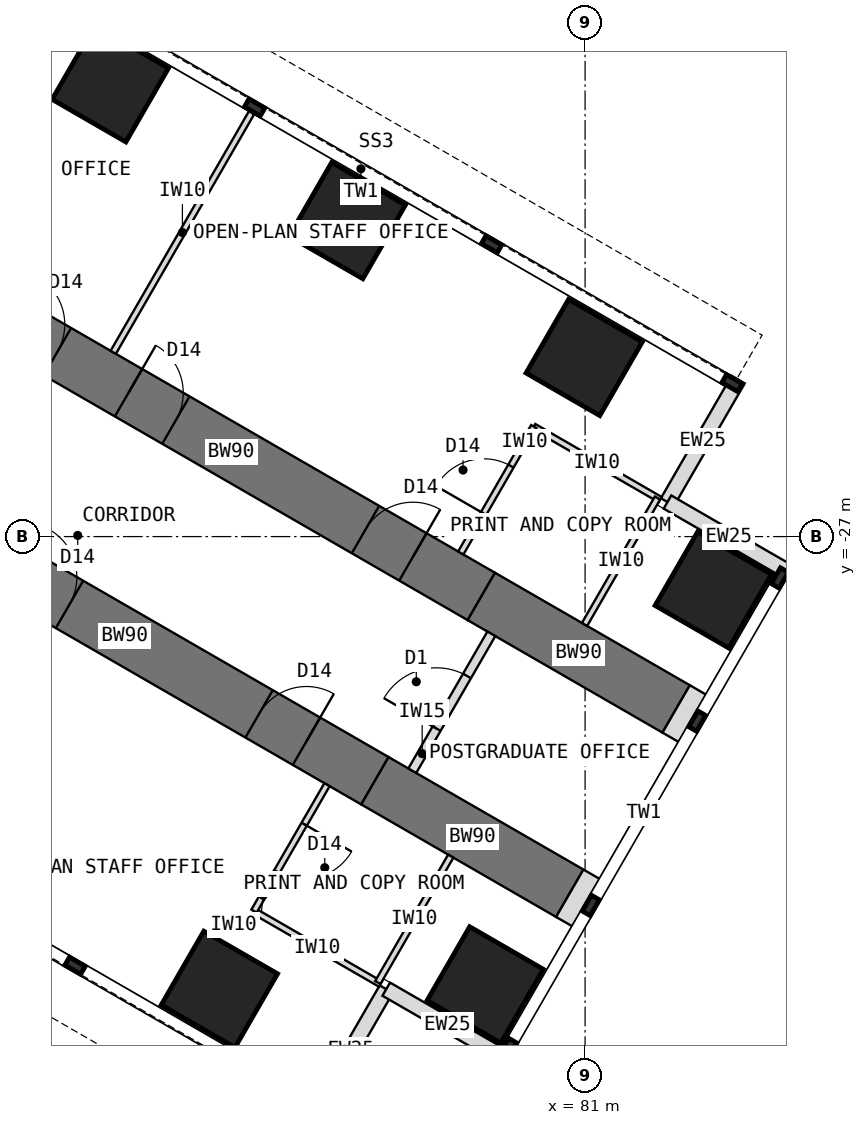
"""IFC4 building model, lengths in metres.
Left out: names, types, materials, properties, quantities, classifications, styles, units other than length and angle.
Written with IfcOpenShell. Run it as: python <this file> out.ifc"""

import sys

from ifc_helpers import new_model, si_unit, direction, frame, frame_2d, origin, origin_2d, place, context, subcontext, project, spatial, rectangle, extrude, element, fill, save


model = new_model("IFC4")
c1 = context("Model", 3, precision=1e-05, world=origin(), true_north=direction((0.0, 1.0)))
c2 = subcontext(c1, "Body", "Model", "MODEL_VIEW")
j1 = project(units=[si_unit("LENGTHUNIT", "METRE"), si_unit("PLANEANGLEUNIT", "RADIAN")], contexts=[c1])
p1 = place(None, origin())
s1 = spatial("IfcSite", under=j1, at=p1, CompositionType="ELEMENT")
p2 = place(p1, origin())
s2 = spatial("IfcBuilding", under=s1, at=p2, CompositionType="ELEMENT")
p3 = place(p2, frame((0.0, 0.0, 76.5)))
s3 = spatial("IfcBuildingStorey", under=s2, at=p3, CompositionType="ELEMENT", Elevation=76.5)
p4 = place(p3, frame((71.066, -23.234, 0.0), z_axis=(0.0, 0.0, 1.0), x_axis=(0.86602681393, -0.499997557548, 0.0)))
e1 = element("IfcWall", 1, at=p4, inside=s3, PredefinedType="SHEAR", context=c2, shape_type="SweptSolid", body=[
    extrude(rectangle(XDim=9.5, YDim=0.9, at=frame_2d((4.75, 0.0))), origin(), (0.0, 0.0, 1.0), 4.0),
])
p5 = place(p4, frame((0.55, 0.0, 0.0)))
e2 = element("IfcOpeningElement", 2, at=p5, cuts=e1, PredefinedType="OPENING", context=c2, shape_type="SweptSolid", body=[
    extrude(rectangle(XDim=0.9, YDim=2.1, at=frame_2d((0.45, 1.05))), frame((0.0, 0.46, 0.0), z_axis=(0.0, -1.0, 0.0), x_axis=(1.0, 0.0, 0.0)), (0.0, 0.0, 1.0), 0.92),
])
p6 = place(p4, frame((2.8, 0.0, 0.0)))
e3 = element("IfcOpeningElement", 3, at=p6, cuts=e1, PredefinedType="OPENING", context=c2, shape_type="SweptSolid", body=[
    extrude(rectangle(XDim=0.9, YDim=2.1, at=frame_2d((0.45, 1.05))), frame((0.0, 0.46, 0.0), z_axis=(0.0, -1.0, 0.0), x_axis=(1.0, 0.0, 0.0)), (0.0, 0.0, 1.0), 0.92),
])
p7 = place(p4, frame((7.3, 0.0, 0.0)))
e4 = element("IfcOpeningElement", 4, at=p7, cuts=e1, PredefinedType="OPENING", context=c2, shape_type="SweptSolid", body=[
    extrude(rectangle(XDim=0.9, YDim=2.1, at=frame_2d((0.45, 1.05))), frame((0.0, 0.46, 0.0), z_axis=(0.0, -1.0, 0.0), x_axis=(1.0, 0.0, 0.0)), (0.0, 0.0, 1.0), 0.92),
])
p8 = place(p3, frame((79.294, -27.984, 0.0), z_axis=(0.0, 0.0, 1.0), x_axis=(0.866000971088, -0.500042316284, 0.0)))
e5 = element("IfcWall", 5, at=p8, inside=s3, PredefinedType="SHEAR", context=c2, shape_type="SweptSolid", body=[
    extrude(rectangle(XDim=3.7, YDim=0.9, at=frame_2d((1.85, 0.0))), origin(), (0.0, 0.0, 1.0), 4.0),
])
p9 = place(p3, frame((69.316, -26.266, 0.0), z_axis=(0.0, 0.0, 1.0), x_axis=(0.86602681393, -0.499997557548, 0.0)))
e6 = element("IfcWall", 6, at=p9, inside=s3, PredefinedType="SHEAR", context=c2, shape_type="SweptSolid", body=[
    extrude(rectangle(XDim=9.5, YDim=0.9, at=frame_2d((4.75, 0.0))), origin(), (0.0, 0.0, 1.0), 4.0),
])
p10 = place(p9, frame((0.55, 0.0, 0.0)))
e7 = element("IfcOpeningElement", 7, at=p10, cuts=e6, PredefinedType="OPENING", context=c2, shape_type="SweptSolid", body=[
    extrude(rectangle(XDim=0.9, YDim=2.1, at=frame_2d((0.45, 1.05))), frame((0.0, 0.46, 0.0), z_axis=(0.0, -1.0, 0.0), x_axis=(1.0, 0.0, 0.0)), (0.0, 0.0, 1.0), 0.92),
])
p11 = place(p9, frame((2.8, 0.0, 0.0)))
e8 = element("IfcOpeningElement", 8, at=p11, cuts=e6, PredefinedType="OPENING", context=c2, shape_type="SweptSolid", body=[
    extrude(rectangle(XDim=0.9, YDim=2.1, at=frame_2d((0.45, 1.05))), frame((0.0, 0.46, 0.0), z_axis=(0.0, -1.0, 0.0), x_axis=(1.0, 0.0, 0.0)), (0.0, 0.0, 1.0), 0.92),
])
p12 = place(p9, frame((7.3, 0.0, 0.0)))
e9 = element("IfcOpeningElement", 9, at=p12, cuts=e6, PredefinedType="OPENING", context=c2, shape_type="SweptSolid", body=[
    extrude(rectangle(XDim=0.9, YDim=2.1, at=frame_2d((0.45, 1.05))), frame((0.0, 0.46, 0.0), z_axis=(0.0, -1.0, 0.0), x_axis=(1.0, 0.0, 0.0)), (0.0, 0.0, 1.0), 0.92),
])
p13 = place(p3, frame((77.544, -31.016, 0.0), z_axis=(0.0, 0.0, 1.0), x_axis=(0.866029545028, -0.499992827086, 0.0)))
e10 = element("IfcWall", 10, at=p13, inside=s3, PredefinedType="SHEAR", context=c2, shape_type="SweptSolid", body=[
    extrude(rectangle(XDim=3.7, YDim=0.9, at=frame_2d((1.85, 0.0))), origin(), (0.0, 0.0, 1.0), 4.0),
])
for number, where, z_axis, x_axis in (
    (11, (73.191, -19.554, 0.0), (0.0, 0.0, 1.0), (0.5, 0.866, 0.0)),
    (12, (77.088, -21.804, 0.0), (0.0, 0.0, 1.0), (0.5, 0.866, 0.0)),
    (13, (80.986, -24.054, 0.0), (0.0, 0.0, 1.0), (0.5, 0.866, 0.0)),
    (14, (74.986, -34.446, 0.0), (0.0, 0.0, 1.0), (0.5, 0.866, 0.0)),
    (15, (83.108, -27.877, 0.0), (0.0, 0.0, 1.0), (0.5, 0.866, 0.0)),
    (16, (79.358, -34.373, 0.0), (0.0, 0.0, 1.0), (0.5, 0.866, 0.0)),
):
    element("IfcColumn", number, at=place(p3, frame(where, z_axis=z_axis, x_axis=x_axis)), inside=s3, PredefinedType="COLUMN", context=c2, shape_type="SweptSolid", body=[
        extrude(rectangle(XDim=1.4, YDim=1.4, at=origin_2d()), origin(), (0.0, 0.0, 1.0), 4.0),
    ])
for number, where, z_axis, x_axis in (
    (17, (83.517, -24.419, 0.0), (0.0, 0.0, 1.0), (-0.5, -0.866, 0.0)),
    (18, (82.355, -26.432, 0.0), (0.0, 0.0, 1.0), (0.866, -0.5, 0.0)),
    (19, (76.567, -36.456, 0.0), (0.0, 0.0, 1.0), (0.5, 0.866, 0.0)),
    (20, (77.73, -34.443, 0.0), (0.0, 0.0, 1.0), (0.866, -0.5, 0.0)),
):
    element("IfcWall", number, at=place(p3, frame(where, z_axis=z_axis, x_axis=x_axis)), inside=s3, PredefinedType="STANDARD", context=c2, shape_type="SweptSolid", body=[
        extrude(rectangle(XDim=2.325, YDim=0.25, at=frame_2d((1.163, 0.0))), origin(), (0.0, 0.0, 1.0), 3.8),
    ])
for number, where, z_axis, x_axis in (
    (21, (82.498, -29.834, 0.0), (0.0, 0.0, 1.0), (0.866, -0.5, 0.0)),
    (22, (80.748, -32.865, 0.0), (0.0, 0.0, 1.0), (0.866, -0.5, 0.0)),
):
    element("IfcWall", number, at=place(p3, frame(where, z_axis=z_axis, x_axis=x_axis)), inside=s3, PredefinedType="PARTITIONING", context=c2, shape_type="SweptSolid", body=[
        extrude(rectangle(XDim=0.31, YDim=0.9, at=frame_2d((0.155, 0.0))), origin(), (0.0, 0.0, 1.0), 3.8),
    ])
p14 = place(p3, frame((73.24, -23.97, 0.0), z_axis=(0.0, 0.0, 1.0), x_axis=(0.499982560684, 0.866035472144, 0.0)))
e23 = element("IfcWall", 23, at=p14, inside=s3, PredefinedType="PARTITIONING", context=c2, shape_type="SweptSolid", body=[
    extrude(rectangle(XDim=4.55, YDim=0.1, at=frame_2d((2.275, 0.0))), origin(), (0.0, 0.0, 1.0), 3.8),
])
p15 = place(p3, frame((80.156, -25.191, 0.0), z_axis=(0.0, 0.0, 1.0), x_axis=(0.865980596518, -0.500077600433, 0.0)))
e24 = element("IfcWall", 24, at=p15, inside=s3, PredefinedType="PARTITIONING", context=c2, shape_type="SweptSolid", body=[
    extrude(rectangle(XDim=2.4, YDim=0.1, at=frame_2d((1.2, 0.0))), origin(), (0.0, 0.0, 1.0), 3.8),
])
p16 = place(p3, frame((78.956, -27.27, 0.0), z_axis=(0.0, 0.0, 1.0), x_axis=(0.500033551112, 0.866006032174, 0.0)))
e25 = element("IfcWall", 25, at=p16, inside=s3, PredefinedType="PARTITIONING", context=c2, shape_type="SweptSolid", body=[
    extrude(rectangle(XDim=2.4, YDim=0.1, at=frame_2d((1.2, 0.0))), origin(), (0.0, 0.0, 1.0), 3.8),
])
p17 = place(p16, frame((0.75, 0.0, 0.0)))
e26 = element("IfcOpeningElement", 26, at=p17, cuts=e25, PredefinedType="OPENING", context=c2, shape_type="SweptSolid", body=[
    extrude(rectangle(XDim=0.9, YDim=2.1, at=frame_2d((0.45, 1.05))), frame((0.0, 0.06, 0.0), z_axis=(0.0, -1.0, 0.0), x_axis=(1.0, 0.0, 0.0)), (0.0, 0.0, 1.0), 0.12),
])
p18 = place(p3, frame((80.991, -28.445, 0.0), z_axis=(0.0, 0.0, 1.0), x_axis=(0.500033551112, 0.866006032174, 0.0)))
e27 = element("IfcWall", 27, at=p18, inside=s3, PredefinedType="PARTITIONING", context=c2, shape_type="SweptSolid", body=[
    extrude(rectangle(XDim=2.4, YDim=0.1, at=frame_2d((1.2, 0.0))), origin(), (0.0, 0.0, 1.0), 3.8),
])
p19 = place(p3, frame((75.556, -33.159, 0.0), z_axis=(0.0, 0.0, 1.0), x_axis=(0.866024647952, -0.500001309137, 0.0)))
e28 = element("IfcWall", 28, at=p19, inside=s3, PredefinedType="PARTITIONING", context=c2, shape_type="SweptSolid", body=[
    extrude(rectangle(XDim=2.4, YDim=0.1, at=frame_2d((1.2, 0.0))), origin(), (0.0, 0.0, 1.0), 3.8),
])
p20 = place(p3, frame((76.756, -31.08, 0.0), z_axis=(0.0, 0.0, 1.0), x_axis=(-0.500001309137, -0.866024647952, 0.0)))
e29 = element("IfcWall", 29, at=p20, inside=s3, PredefinedType="PARTITIONING", context=c2, shape_type="SweptSolid", body=[
    extrude(rectangle(XDim=2.4, YDim=0.1, at=frame_2d((1.2, 0.0))), origin(), (0.0, 0.0, 1.0), 3.8),
])
p21 = place(p20, frame((0.75, 0.0, 0.0)))
e30 = element("IfcOpeningElement", 30, at=p21, cuts=e29, PredefinedType="OPENING", context=c2, shape_type="SweptSolid", body=[
    extrude(rectangle(XDim=0.9, YDim=2.1, at=frame_2d((0.45, 1.05))), frame((0.0, 0.06, 0.0), z_axis=(0.0, -1.0, 0.0), x_axis=(1.0, 0.0, 0.0)), (0.0, 0.0, 1.0), 0.12),
])
p22 = place(p3, frame((78.791, -32.255, 0.0), z_axis=(0.0, 0.0, 1.0), x_axis=(-0.500001309137, -0.866024647952, 0.0)))
e31 = element("IfcWall", 31, at=p22, inside=s3, PredefinedType="PARTITIONING", context=c2, shape_type="SweptSolid", body=[
    extrude(rectangle(XDim=2.4, YDim=0.1, at=frame_2d((1.2, 0.0))), origin(), (0.0, 0.0, 1.0), 3.8),
])
p23 = place(p3, frame((78.158, -30.851, 0.0), z_axis=(0.0, 0.0, 1.0), x_axis=(0.500006934395, 0.866021400173, 0.0)))
e32 = element("IfcWall", 32, at=p23, inside=s3, PredefinedType="PARTITIONING", context=c2, shape_type="SweptSolid", body=[
    extrude(rectangle(XDim=2.6, YDim=0.15, at=frame_2d((1.3, 0.0))), origin(), (0.0, 0.0, 1.0), 3.8),
])
p24 = place(p23, frame((0.8, 0.0, 0.0)))
e33 = element("IfcOpeningElement", 33, at=p24, cuts=e32, PredefinedType="OPENING", context=c2, shape_type="SweptSolid", body=[
    extrude(rectangle(XDim=1.0, YDim=2.1, at=frame_2d((0.5, 1.05))), frame((0.0, 0.085, 0.0), z_axis=(0.0, -1.0, 0.0), x_axis=(1.0, 0.0, 0.0)), (0.0, 0.0, 1.0), 0.17),
])
p25 = place(p17, origin())
e34 = element("IfcDoor", 34, at=p25, inside=s3, OperationType="SINGLE_SWING_LEFT", PredefinedType="DOOR", context=c2, shape_type="SweptSolid", body=[
    extrude(rectangle(XDim=0.9, YDim=2.1, at=frame_2d((0.45, 1.05))), frame((0.0, 0.025, 0.0), z_axis=(0.0, -1.0, 0.0), x_axis=(1.0, 0.0, 0.0)), (0.0, 0.0, 1.0), 0.05),
])
fill(e26, e34)
p26 = place(p21, origin())
e35 = element("IfcDoor", 35, at=p26, inside=s3, OperationType="SINGLE_SWING_LEFT", PredefinedType="DOOR", context=c2, shape_type="SweptSolid", body=[
    extrude(rectangle(XDim=0.9, YDim=2.1, at=frame_2d((0.45, 1.05))), frame((0.0, 0.025, 0.0), z_axis=(0.0, -1.0, 0.0), x_axis=(1.0, 0.0, 0.0)), (0.0, 0.0, 1.0), 0.05),
])
fill(e30, e35)
p27 = place(p24, origin())
e36 = element("IfcDoor", 36, at=p27, inside=s3, OperationType="SINGLE_SWING_LEFT", PredefinedType="DOOR", context=c2, shape_type="SweptSolid", body=[
    extrude(rectangle(XDim=1.0, YDim=2.1, at=frame_2d((0.5, 1.05))), frame((0.0, 0.025, 0.0), z_axis=(0.0, -1.0, 0.0), x_axis=(1.0, 0.0, 0.0)), (0.0, 0.0, 1.0), 0.05),
])
fill(e33, e36)
p28 = place(p5, origin())
e37 = element("IfcDoor", 37, at=p28, inside=s3, OperationType="SINGLE_SWING_LEFT", PredefinedType="DOOR", context=c2, shape_type="SweptSolid", body=[
    extrude(rectangle(XDim=0.82, YDim=2.06, at=frame_2d((0.45, 1.03))), frame((0.0, 0.025, 0.0), z_axis=(0.0, -1.0, 0.0), x_axis=(1.0, 0.0, 0.0)), (0.0, 0.0, 1.0), 0.05),
    extrude(rectangle(XDim=0.04, YDim=2.1, at=frame_2d((0.02, 1.05))), frame((0.0, 0.45, 0.0), z_axis=(0.0, -1.0, 0.0), x_axis=(1.0, 0.0, 0.0)), (0.0, 0.0, 1.0), 0.899),
    extrude(rectangle(XDim=0.04, YDim=2.1, at=frame_2d((0.88, 1.05))), frame((0.0, 0.45, 0.0), z_axis=(0.0, -1.0, 0.0), x_axis=(1.0, 0.0, 0.0)), (0.0, 0.0, 1.0), 0.899),
    extrude(rectangle(XDim=0.82, YDim=0.04, at=frame_2d((0.45, 2.08))), frame((0.0, 0.45, 0.0), z_axis=(0.0, -1.0, 0.0), x_axis=(1.0, 0.0, 0.0)), (0.0, 0.0, 1.0), 0.899),
])
fill(e2, e37)
p29 = place(p6, origin())
e38 = element("IfcDoor", 38, at=p29, inside=s3, OperationType="SINGLE_SWING_LEFT", PredefinedType="DOOR", context=c2, shape_type="SweptSolid", body=[
    extrude(rectangle(XDim=0.82, YDim=2.06, at=frame_2d((0.45, 1.03))), frame((0.0, 0.025, 0.0), z_axis=(0.0, -1.0, 0.0), x_axis=(1.0, 0.0, 0.0)), (0.0, 0.0, 1.0), 0.05),
    extrude(rectangle(XDim=0.04, YDim=2.1, at=frame_2d((0.02, 1.05))), frame((0.0, 0.45, 0.0), z_axis=(0.0, -1.0, 0.0), x_axis=(1.0, 0.0, 0.0)), (0.0, 0.0, 1.0), 0.899),
    extrude(rectangle(XDim=0.04, YDim=2.1, at=frame_2d((0.88, 1.05))), frame((0.0, 0.45, 0.0), z_axis=(0.0, -1.0, 0.0), x_axis=(1.0, 0.0, 0.0)), (0.0, 0.0, 1.0), 0.899),
    extrude(rectangle(XDim=0.82, YDim=0.04, at=frame_2d((0.45, 2.08))), frame((0.0, 0.45, 0.0), z_axis=(0.0, -1.0, 0.0), x_axis=(1.0, 0.0, 0.0)), (0.0, 0.0, 1.0), 0.899),
])
fill(e3, e38)
p30 = place(p7, origin())
e39 = element("IfcDoor", 39, at=p30, inside=s3, OperationType="SINGLE_SWING_RIGHT", PredefinedType="DOOR", context=c2, shape_type="SweptSolid", body=[
    extrude(rectangle(XDim=0.82, YDim=2.06, at=frame_2d((0.45, 1.03))), frame((0.0, 0.025, 0.0), z_axis=(0.0, -1.0, 0.0), x_axis=(1.0, 0.0, 0.0)), (0.0, 0.0, 1.0), 0.05),
    extrude(rectangle(XDim=0.04, YDim=2.1, at=frame_2d((0.02, 1.05))), frame((0.0, 0.45, 0.0), z_axis=(0.0, -1.0, 0.0), x_axis=(1.0, 0.0, 0.0)), (0.0, 0.0, 1.0), 0.899),
    extrude(rectangle(XDim=0.04, YDim=2.1, at=frame_2d((0.88, 1.05))), frame((0.0, 0.45, 0.0), z_axis=(0.0, -1.0, 0.0), x_axis=(1.0, 0.0, 0.0)), (0.0, 0.0, 1.0), 0.899),
    extrude(rectangle(XDim=0.82, YDim=0.04, at=frame_2d((0.45, 2.08))), frame((0.0, 0.45, 0.0), z_axis=(0.0, -1.0, 0.0), x_axis=(1.0, 0.0, 0.0)), (0.0, 0.0, 1.0), 0.899),
])
fill(e4, e39)
p31 = place(p11, origin())
e40 = element("IfcDoor", 40, at=p31, inside=s3, OperationType="SINGLE_SWING_LEFT", PredefinedType="DOOR", context=c2, shape_type="SweptSolid", body=[
    extrude(rectangle(XDim=0.82, YDim=2.06, at=frame_2d((0.45, 1.03))), frame((0.0, 0.025, 0.0), z_axis=(0.0, -1.0, 0.0), x_axis=(1.0, 0.0, 0.0)), (0.0, 0.0, 1.0), 0.05),
    extrude(rectangle(XDim=0.04, YDim=2.1, at=frame_2d((0.02, 1.05))), frame((0.0, 0.45, 0.0), z_axis=(0.0, -1.0, 0.0), x_axis=(1.0, 0.0, 0.0)), (0.0, 0.0, 1.0), 0.899),
    extrude(rectangle(XDim=0.04, YDim=2.1, at=frame_2d((0.88, 1.05))), frame((0.0, 0.45, 0.0), z_axis=(0.0, -1.0, 0.0), x_axis=(1.0, 0.0, 0.0)), (0.0, 0.0, 1.0), 0.899),
    extrude(rectangle(XDim=0.82, YDim=0.04, at=frame_2d((0.45, 2.08))), frame((0.0, 0.45, 0.0), z_axis=(0.0, -1.0, 0.0), x_axis=(1.0, 0.0, 0.0)), (0.0, 0.0, 1.0), 0.899),
])
fill(e8, e40)
p32 = place(p12, origin())
e41 = element("IfcDoor", 41, at=p32, inside=s3, OperationType="SINGLE_SWING_RIGHT", PredefinedType="DOOR", context=c2, shape_type="SweptSolid", body=[
    extrude(rectangle(XDim=0.82, YDim=2.06, at=frame_2d((0.45, 1.03))), frame((0.0, 0.025, 0.0), z_axis=(0.0, -1.0, 0.0), x_axis=(1.0, 0.0, 0.0)), (0.0, 0.0, 1.0), 0.05),
    extrude(rectangle(XDim=0.04, YDim=2.1, at=frame_2d((0.02, 1.05))), frame((0.0, 0.45, 0.0), z_axis=(0.0, -1.0, 0.0), x_axis=(1.0, 0.0, 0.0)), (0.0, 0.0, 1.0), 0.899),
    extrude(rectangle(XDim=0.04, YDim=2.1, at=frame_2d((0.88, 1.05))), frame((0.0, 0.45, 0.0), z_axis=(0.0, -1.0, 0.0), x_axis=(1.0, 0.0, 0.0)), (0.0, 0.0, 1.0), 0.899),
    extrude(rectangle(XDim=0.82, YDim=0.04, at=frame_2d((0.45, 2.08))), frame((0.0, 0.45, 0.0), z_axis=(0.0, -1.0, 0.0), x_axis=(1.0, 0.0, 0.0)), (0.0, 0.0, 1.0), 0.899),
])
fill(e9, e41)
save(model, sys.argv[1])
